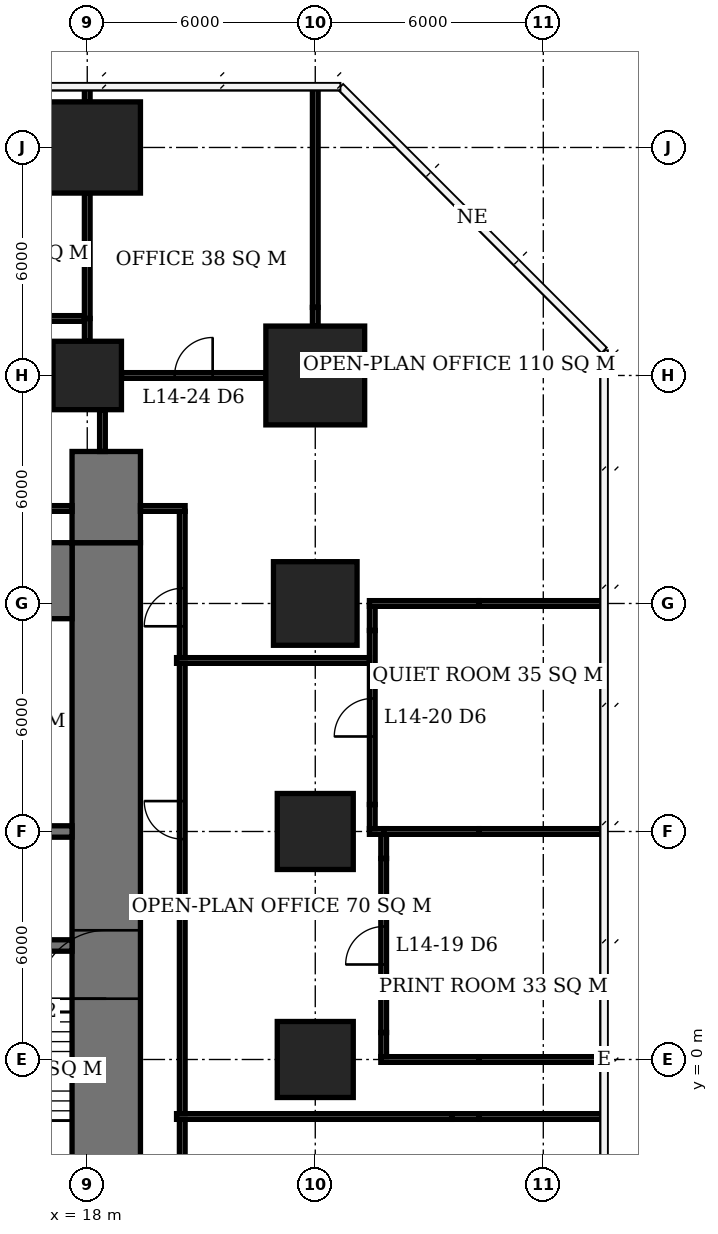
"""IFC4 building model, lengths in metres.
Left out: names, types, materials, properties, quantities, classifications, styles, units other than length and angle.
Written with IfcOpenShell. Run it as: python <this file> out.ifc"""

import sys

from ifc_helpers import new_model, si_unit, direction, frame, frame_2d, origin, origin_2d, place, context, subcontext, project, spatial, rectangle, extrude, element, fill, save


model = new_model("IFC4")
c1 = context("Model", 3, precision=1e-05, world=origin(), true_north=direction((0.0, 1.0)))
c2 = subcontext(c1, "Body", "Model", "MODEL_VIEW")
j1 = project(units=[si_unit("LENGTHUNIT", "METRE"), si_unit("PLANEANGLEUNIT", "RADIAN")], contexts=[c1])
p1 = place(None, origin())
s1 = spatial("IfcSite", under=j1, at=p1, CompositionType="ELEMENT")
p2 = place(p1, origin())
s2 = spatial("IfcBuilding", under=s1, at=p2, CompositionType="ELEMENT")
p3 = place(p2, frame((0.0, 0.0, 61.1)))
s3 = spatial("IfcBuildingStorey", under=s2, at=p3, CompositionType="ELEMENT", Elevation=61.1)
p4 = place(p3, frame((18.0, 18.0, 0.0), z_axis=(0.0, 0.0, 1.0), x_axis=(1.0, 0.0, 0.0)))
e1 = element("IfcColumn", 1, at=p4, inside=s3, PredefinedType="COLUMN", context=c2, shape_type="SweptSolid", body=[
    extrude(rectangle(XDim=1.8, YDim=1.8, at=origin_2d()), origin(), (0.0, 0.0, 1.0), 3.9),
])
p5 = place(p3, frame((18.0, 24.0, 0.0), z_axis=(0.0, 0.0, 1.0), x_axis=(1.0, 0.0, 0.0)))
e2 = element("IfcColumn", 2, at=p5, inside=s3, PredefinedType="COLUMN", context=c2, shape_type="SweptSolid", body=[
    extrude(rectangle(XDim=2.8, YDim=2.4, at=origin_2d()), origin(), (0.0, 0.0, 1.0), 3.9),
])
for number, where, z_axis, x_axis in (
    (3, (24.0, 0.0, 0.0), (0.0, 0.0, 1.0), (1.0, 0.0, 0.0)),
    (4, (24.0, 6.0, 0.0), (0.0, 0.0, 1.0), (1.0, 0.0, 0.0)),
):
    element("IfcColumn", number, at=place(p3, frame(where, z_axis=z_axis, x_axis=x_axis)), inside=s3, PredefinedType="COLUMN", context=c2, shape_type="SweptSolid", body=[
        extrude(rectangle(XDim=2.0, YDim=2.0, at=origin_2d()), origin(), (0.0, 0.0, 1.0), 3.9),
    ])
p6 = place(p3, frame((24.0, 12.0, 0.0), z_axis=(0.0, 0.0, 1.0), x_axis=(1.0, 0.0, 0.0)))
e5 = element("IfcColumn", 5, at=p6, inside=s3, PredefinedType="COLUMN", context=c2, shape_type="SweptSolid", body=[
    extrude(rectangle(XDim=2.2, YDim=2.2, at=origin_2d()), origin(), (0.0, 0.0, 1.0), 3.9),
])
p7 = place(p3, frame((24.0, 18.0, 0.0), z_axis=(0.0, 0.0, 1.0), x_axis=(1.0, 0.0, 0.0)))
e6 = element("IfcColumn", 6, at=p7, inside=s3, PredefinedType="COLUMN", context=c2, shape_type="SweptSolid", body=[
    extrude(rectangle(XDim=2.6, YDim=2.6, at=origin_2d()), origin(), (0.0, 0.0, 1.0), 3.9),
])
p8 = place(p3, frame((-5.6, 12.6, 0.0), z_axis=(0.0, 0.0, 1.0), x_axis=(1.0, 0.0, 0.0)))
e7 = element("IfcWall", 7, at=p8, inside=s3, PredefinedType="SHEAR", context=c2, shape_type="SweptSolid", body=[
    extrude(rectangle(XDim=23.2, YDim=2.0, at=frame_2d((11.6, 0.0))), origin(), (0.0, 0.0, 1.0), 3.9),
])
p9 = place(p3, frame((18.5, -7.6, 0.0), z_axis=(0.0, 0.0, 1.0), x_axis=(0.0, 1.0, 0.0)))
e8 = element("IfcWall", 8, at=p9, inside=s3, PredefinedType="SHEAR", context=c2, shape_type="SweptSolid", body=[
    extrude(rectangle(XDim=21.2, YDim=1.8, at=frame_2d((10.6, 0.0))), origin(), (0.0, 0.0, 1.0), 3.9),
])
p10 = place(p9, frame((9.2, 0.0, 0.0)))
e9 = element("IfcOpeningElement", 9, at=p10, cuts=e8, PredefinedType="OPENING", context=c2, shape_type="SweptSolid", body=[
    extrude(rectangle(XDim=1.8, YDim=2.4, at=frame_2d((0.9, 1.2))), frame((0.0, 0.91, 0.0), z_axis=(0.0, -1.0, 0.0), x_axis=(1.0, 0.0, 0.0)), (0.0, 0.0, 1.0), 1.82),
])
p11 = place(p3, frame((18.5, 13.6, 0.0), z_axis=(0.0, 0.0, 1.0), x_axis=(0.0, 1.0, 0.0)))
e10 = element("IfcWall", 10, at=p11, inside=s3, PredefinedType="SHEAR", context=c2, shape_type="SweptSolid", body=[
    extrude(rectangle(XDim=2.4, YDim=1.8, at=frame_2d((1.2, 0.0))), origin(), (0.0, 0.0, 1.0), 3.9),
])
p12 = place(p3, frame((12.15, 3.0, 0.0), z_axis=(0.0, 0.0, 1.0), x_axis=(1.0, 0.0, 0.0)))
e11 = element("IfcWall", 11, at=p12, inside=s3, PredefinedType="SHEAR", context=c2, shape_type="SweptSolid", body=[
    extrude(rectangle(XDim=5.45, YDim=0.3, at=frame_2d((2.725, 0.0))), origin(), (0.0, 0.0, 1.0), 3.9),
])
p13 = place(p12, frame((3.25, 0.0, 0.0)))
e12 = element("IfcOpeningElement", 12, at=p13, cuts=e11, PredefinedType="OPENING", context=c2, shape_type="SweptSolid", body=[
    extrude(rectangle(XDim=1.2, YDim=2.1, at=frame_2d((0.6, 1.05))), frame((0.0, 0.16, 0.0), z_axis=(0.0, -1.0, 0.0), x_axis=(1.0, 0.0, 0.0)), (0.0, 0.0, 1.0), 0.32),
])
p14 = place(p12, frame((0.45, 0.0, 0.0)))
e13 = element("IfcOpeningElement", 13, at=p14, cuts=e11, PredefinedType="OPENING", context=c2, shape_type="SweptSolid", body=[
    extrude(rectangle(XDim=0.9, YDim=2.1, at=frame_2d((0.45, 1.05))), frame((0.0, 0.16, 0.0), z_axis=(0.0, -1.0, 0.0), x_axis=(1.0, 0.0, 0.0)), (0.0, 0.0, 1.0), 0.32),
])
p15 = place(p3, frame((-0.15, 6.0, 0.0), z_axis=(0.0, 0.0, 1.0), x_axis=(1.0, 0.0, 0.0)))
e14 = element("IfcWall", 14, at=p15, inside=s3, PredefinedType="SHEAR", context=c2, shape_type="SweptSolid", body=[
    extrude(rectangle(XDim=17.75, YDim=0.3, at=frame_2d((8.875, 0.0))), origin(), (0.0, 0.0, 1.0), 3.9),
])
p16 = place(p15, frame((13.15, 0.0, 0.0)))
e15 = element("IfcOpeningElement", 15, at=p16, cuts=e14, PredefinedType="OPENING", context=c2, shape_type="SweptSolid", body=[
    extrude(rectangle(XDim=0.9, YDim=2.1, at=frame_2d((0.45, 1.05))), frame((0.0, 0.16, 0.0), z_axis=(0.0, -1.0, 0.0), x_axis=(1.0, 0.0, 0.0)), (0.0, 0.0, 1.0), 0.32),
])
p17 = place(p15, frame((1.1, 0.0, 0.0)))
e16 = element("IfcOpeningElement", 16, at=p17, cuts=e14, PredefinedType="OPENING", context=c2, shape_type="SweptSolid", body=[
    extrude(rectangle(XDim=1.1, YDim=2.1, at=frame_2d((0.55, 1.05))), frame((0.0, 0.16, 0.0), z_axis=(0.0, -1.0, 0.0), x_axis=(1.0, 0.0, 0.0)), (0.0, 0.0, 1.0), 0.32),
])
p18 = place(p15, frame((4.1, 0.0, 0.0)))
e17 = element("IfcOpeningElement", 17, at=p18, cuts=e14, PredefinedType="OPENING", context=c2, shape_type="SweptSolid", body=[
    extrude(rectangle(XDim=1.1, YDim=2.1, at=frame_2d((0.55, 1.05))), frame((0.0, 0.16, 0.0), z_axis=(0.0, -1.0, 0.0), x_axis=(1.0, 0.0, 0.0)), (0.0, 0.0, 1.0), 0.32),
])
p19 = place(p15, frame((7.1, 0.0, 0.0)))
e18 = element("IfcOpeningElement", 18, at=p19, cuts=e14, PredefinedType="OPENING", context=c2, shape_type="SweptSolid", body=[
    extrude(rectangle(XDim=1.1, YDim=2.1, at=frame_2d((0.55, 1.05))), frame((0.0, 0.16, 0.0), z_axis=(0.0, -1.0, 0.0), x_axis=(1.0, 0.0, 0.0)), (0.0, 0.0, 1.0), 0.32),
])
p20 = place(p15, frame((10.1, 0.0, 0.0)))
e19 = element("IfcOpeningElement", 19, at=p20, cuts=e14, PredefinedType="OPENING", context=c2, shape_type="SweptSolid", body=[
    extrude(rectangle(XDim=1.1, YDim=2.1, at=frame_2d((0.55, 1.05))), frame((0.0, 0.16, 0.0), z_axis=(0.0, -1.0, 0.0), x_axis=(1.0, 0.0, 0.0)), (0.0, 0.0, 1.0), 0.32),
])
p21 = place(p3, frame((25.725, 0.0, 0.0), z_axis=(0.0, 0.0, 1.0), x_axis=(1.0, 0.0, 0.0)))
e20 = element("IfcWall", 20, at=p21, inside=s3, PredefinedType="PARTITIONING", context=c2, shape_type="SweptSolid", body=[
    extrude(rectangle(XDim=2.585, YDim=0.15, at=frame_2d((1.292, 0.0))), origin(), (0.0, 0.0, 1.0), 2.65),
])
p22 = place(p3, frame((28.31, 0.0, 0.0), z_axis=(0.0, 0.0, 1.0), x_axis=(1.0, 0.0, 0.0)))
e21 = element("IfcWall", 21, at=p22, inside=s3, PredefinedType="PARTITIONING", context=c2, shape_type="SweptSolid", body=[
    extrude(rectangle(XDim=3.24, YDim=0.15, at=frame_2d((1.62, 0.0))), origin(), (0.0, 0.0, 1.0), 3.65),
])
p23 = place(p3, frame((25.425, 6.0, 0.0), z_axis=(0.0, 0.0, 1.0), x_axis=(1.0, 0.0, 0.0)))
e22 = element("IfcWall", 22, at=p23, inside=s3, PredefinedType="PARTITIONING", context=c2, shape_type="SweptSolid", body=[
    extrude(rectangle(XDim=0.45, YDim=0.15, at=frame_2d((0.225, 0.0))), origin(), (0.0, 0.0, 1.0), 2.65),
])
p24 = place(p3, frame((25.8, 6.0, 0.0), z_axis=(0.0, 0.0, 1.0), x_axis=(1.0, 0.0, 0.0)))
e23 = element("IfcWall", 23, at=p24, inside=s3, PredefinedType="PARTITIONING", context=c2, shape_type="SweptSolid", body=[
    extrude(rectangle(XDim=2.51, YDim=0.15, at=frame_2d((1.255, 0.0))), origin(), (0.0, 0.0, 1.0), 2.65),
])
p25 = place(p3, frame((28.31, 6.0, 0.0), z_axis=(0.0, 0.0, 1.0), x_axis=(1.0, 0.0, 0.0)))
e24 = element("IfcWall", 24, at=p25, inside=s3, PredefinedType="PARTITIONING", context=c2, shape_type="SweptSolid", body=[
    extrude(rectangle(XDim=3.29, YDim=0.15, at=frame_2d((1.645, 0.0))), origin(), (0.0, 0.0, 1.0), 3.65),
])
p26 = place(p3, frame((25.425, 12.0, 0.0), z_axis=(0.0, 0.0, 1.0), x_axis=(1.0, 0.0, 0.0)))
e25 = element("IfcWall", 25, at=p26, inside=s3, PredefinedType="PARTITIONING", context=c2, shape_type="SweptSolid", body=[
    extrude(rectangle(XDim=2.885, YDim=0.15, at=frame_2d((1.442, 0.0))), origin(), (0.0, 0.0, 1.0), 2.65),
])
p27 = place(p3, frame((28.31, 12.0, 0.0), z_axis=(0.0, 0.0, 1.0), x_axis=(1.0, 0.0, 0.0)))
e26 = element("IfcWall", 26, at=p27, inside=s3, PredefinedType="PARTITIONING", context=c2, shape_type="SweptSolid", body=[
    extrude(rectangle(XDim=3.29, YDim=0.15, at=frame_2d((1.645, 0.0))), origin(), (0.0, 0.0, 1.0), 3.65),
])
p28 = place(p3, frame((18.9, 18.0, 0.0), z_axis=(0.0, 0.0, 1.0), x_axis=(1.0, 0.0, 0.0)))
e27 = element("IfcWall", 27, at=p28, inside=s3, PredefinedType="PARTITIONING", context=c2, shape_type="SweptSolid", body=[
    extrude(rectangle(XDim=3.8, YDim=0.15, at=frame_2d((1.9, 0.0))), origin(), (0.0, 0.0, 1.0), 3.65),
])
p29 = place(p28, frame((1.4, 0.0, 0.0)))
e28 = element("IfcOpeningElement", 28, at=p29, cuts=e27, PredefinedType="OPENING", context=c2, shape_type="SweptSolid", body=[
    extrude(rectangle(XDim=1.0, YDim=2.1, at=frame_2d((0.5, 1.05))), frame((0.0, 0.085, 0.0), z_axis=(0.0, -1.0, 0.0), x_axis=(1.0, 0.0, 0.0)), (0.0, 0.0, 1.0), 0.17),
])
p30 = place(p3, frame((12.075, 19.5, 0.0), z_axis=(0.0, 0.0, 1.0), x_axis=(1.0, 0.0, 0.0)))
e29 = element("IfcWall", 29, at=p30, inside=s3, PredefinedType="PARTITIONING", context=c2, shape_type="SweptSolid", body=[
    extrude(rectangle(XDim=5.85, YDim=0.15, at=frame_2d((2.925, 0.0))), origin(), (0.0, 0.0, 1.0), 3.65),
])
p31 = place(p30, frame((2.425, 0.0, 0.0)))
e30 = element("IfcOpeningElement", 30, at=p31, cuts=e29, PredefinedType="OPENING", context=c2, shape_type="SweptSolid", body=[
    extrude(rectangle(XDim=1.0, YDim=2.1, at=frame_2d((0.5, 1.05))), frame((0.0, 0.085, 0.0), z_axis=(0.0, -1.0, 0.0), x_axis=(1.0, 0.0, 0.0)), (0.0, 0.0, 1.0), 0.17),
])
p32 = place(p3, frame((18.0, 18.9, 0.0), z_axis=(0.0, 0.0, 1.0), x_axis=(0.0, 1.0, 0.0)))
e31 = element("IfcWall", 31, at=p32, inside=s3, PredefinedType="PARTITIONING", context=c2, shape_type="SweptSolid", body=[
    extrude(rectangle(XDim=0.6, YDim=0.15, at=frame_2d((0.3, 0.0))), origin(), (0.0, 0.0, 1.0), 3.65),
])
p33 = place(p3, frame((18.0, 19.5, 0.0), z_axis=(0.0, 0.0, 1.0), x_axis=(0.0, 1.0, 0.0)))
e32 = element("IfcWall", 32, at=p33, inside=s3, PredefinedType="PARTITIONING", context=c2, shape_type="SweptSolid", body=[
    extrude(rectangle(XDim=3.3, YDim=0.15, at=frame_2d((1.65, 0.0))), origin(), (0.0, 0.0, 1.0), 3.65),
])
p34 = place(p3, frame((18.0, 25.2, 0.0), z_axis=(0.0, 0.0, 1.0), x_axis=(0.0, 1.0, 0.0)))
e33 = element("IfcWall", 33, at=p34, inside=s3, PredefinedType="PARTITIONING", context=c2, shape_type="SweptSolid", body=[
    extrude(rectangle(XDim=0.4, YDim=0.15, at=frame_2d((0.2, 0.0))), origin(), (0.0, 0.0, 1.0), 2.65),
])
p35 = place(p3, frame((24.0, 19.3, 0.0), z_axis=(0.0, 0.0, 1.0), x_axis=(0.0, 1.0, 0.0)))
e34 = element("IfcWall", 34, at=p35, inside=s3, PredefinedType="PARTITIONING", context=c2, shape_type="SweptSolid", body=[
    extrude(rectangle(XDim=0.492, YDim=0.15, at=frame_2d((0.246, 0.0))), origin(), (0.0, 0.0, 1.0), 2.65),
])
p36 = place(p3, frame((24.0, 19.792, 0.0), z_axis=(0.0, 0.0, 1.0), x_axis=(0.0, 1.0, 0.0)))
e35 = element("IfcWall", 35, at=p36, inside=s3, PredefinedType="PARTITIONING", context=c2, shape_type="SweptSolid", body=[
    extrude(rectangle(XDim=5.793, YDim=0.15, at=frame_2d((2.896, 0.0))), origin(), (0.0, 0.0, 1.0), 3.65),
])
p37 = place(p3, frame((25.5, 6.075, 0.0), z_axis=(0.0, 0.0, 1.0), x_axis=(0.0, 1.0, 0.0)))
e36 = element("IfcWall", 36, at=p37, inside=s3, PredefinedType="PARTITIONING", context=c2, shape_type="SweptSolid", body=[
    extrude(rectangle(XDim=0.635, YDim=0.15, at=frame_2d((0.317, 0.0))), origin(), (0.0, 0.0, 1.0), 2.65),
])
p38 = place(p3, frame((25.5, 6.71, 0.0), z_axis=(0.0, 0.0, 1.0), x_axis=(0.0, 1.0, 0.0)))
e37 = element("IfcWall", 37, at=p38, inside=s3, PredefinedType="PARTITIONING", context=c2, shape_type="SweptSolid", body=[
    extrude(rectangle(XDim=4.58, YDim=0.15, at=frame_2d((2.29, 0.0))), origin(), (0.0, 0.0, 1.0), 3.65),
])
p39 = place(p38, frame((1.79, 0.0, 0.0)))
e38 = element("IfcOpeningElement", 38, at=p39, cuts=e37, PredefinedType="OPENING", context=c2, shape_type="SweptSolid", body=[
    extrude(rectangle(XDim=1.0, YDim=2.1, at=frame_2d((0.5, 1.05))), frame((0.0, 0.085, 0.0), z_axis=(0.0, -1.0, 0.0), x_axis=(1.0, 0.0, 0.0)), (0.0, 0.0, 1.0), 0.17),
])
for number, where, z_axis, x_axis in (
    (39, (25.5, 11.29, 0.0), (0.0, 0.0, 1.0), (0.0, 1.0, 0.0)),
    (40, (25.8, 0.075, 0.0), (0.0, 0.0, 1.0), (0.0, 1.0, 0.0)),
):
    element("IfcWall", number, at=place(p3, frame(where, z_axis=z_axis, x_axis=x_axis)), inside=s3, PredefinedType="PARTITIONING", context=c2, shape_type="SweptSolid", body=[
        extrude(rectangle(XDim=0.635, YDim=0.15, at=frame_2d((0.317, 0.0))), origin(), (0.0, 0.0, 1.0), 2.65),
    ])
p40 = place(p3, frame((25.8, 0.71, 0.0), z_axis=(0.0, 0.0, 1.0), x_axis=(0.0, 1.0, 0.0)))
e41 = element("IfcWall", 41, at=p40, inside=s3, PredefinedType="PARTITIONING", context=c2, shape_type="SweptSolid", body=[
    extrude(rectangle(XDim=4.58, YDim=0.15, at=frame_2d((2.29, 0.0))), origin(), (0.0, 0.0, 1.0), 3.65),
])
p41 = place(p40, frame((1.79, 0.0, 0.0)))
e42 = element("IfcOpeningElement", 42, at=p41, cuts=e41, PredefinedType="OPENING", context=c2, shape_type="SweptSolid", body=[
    extrude(rectangle(XDim=1.0, YDim=2.1, at=frame_2d((0.5, 1.05))), frame((0.0, 0.085, 0.0), z_axis=(0.0, -1.0, 0.0), x_axis=(1.0, 0.0, 0.0)), (0.0, 0.0, 1.0), 0.17),
])
p42 = place(p3, frame((25.8, 5.29, 0.0), z_axis=(0.0, 0.0, 1.0), x_axis=(0.0, 1.0, 0.0)))
e43 = element("IfcWall", 43, at=p42, inside=s3, PredefinedType="PARTITIONING", context=c2, shape_type="SweptSolid", body=[
    extrude(rectangle(XDim=0.635, YDim=0.15, at=frame_2d((0.317, 0.0))), origin(), (0.0, 0.0, 1.0), 2.65),
])
p43 = place(p3, frame((-5.6, 14.5, 0.0), z_axis=(0.0, 0.0, 1.0), x_axis=(1.0, 0.0, 0.0)))
e44 = element("IfcWall", 44, at=p43, inside=s3, PredefinedType="PARTITIONING", context=c2, shape_type="SweptSolid", body=[
    extrude(rectangle(XDim=23.2, YDim=0.15, at=frame_2d((11.6, 0.0))), origin(), (0.0, 0.0, 1.0), 3.65),
])
p44 = place(p43, frame((14.58, 0.0, 0.0)))
e45 = element("IfcOpeningElement", 45, at=p44, cuts=e44, PredefinedType="OPENING", context=c2, shape_type="SweptSolid", body=[
    extrude(rectangle(XDim=1.0, YDim=2.1, at=frame_2d((0.5, 1.05))), frame((0.0, 0.085, 0.0), z_axis=(0.0, -1.0, 0.0), x_axis=(1.0, 0.0, 0.0)), (0.0, 0.0, 1.0), 0.17),
])
p45 = place(p3, frame((18.4, 16.0, 0.0), z_axis=(0.0, 0.0, 1.0), x_axis=(0.0, 1.0, 0.0)))
e46 = element("IfcWall", 46, at=p45, inside=s3, PredefinedType="PARTITIONING", context=c2, shape_type="SweptSolid", body=[
    extrude(rectangle(XDim=1.1, YDim=0.15, at=frame_2d((0.55, 0.0))), origin(), (0.0, 0.0, 1.0), 3.65),
])
p46 = place(p3, frame((19.4, 14.5, 0.0), z_axis=(0.0, 0.0, 1.0), x_axis=(1.0, 0.0, 0.0)))
e47 = element("IfcWall", 47, at=p46, inside=s3, PredefinedType="PARTITIONING", context=c2, shape_type="SweptSolid", body=[
    extrude(rectangle(XDim=1.175, YDim=0.15, at=frame_2d((0.587, 0.0))), origin(), (0.0, 0.0, 1.0), 3.65),
])
p47 = place(p3, frame((20.5, -8.425, 0.0), z_axis=(0.0, 0.0, 1.0), x_axis=(0.0, 1.0, 0.0)))
e48 = element("IfcWall", 48, at=p47, inside=s3, PredefinedType="PARTITIONING", context=c2, shape_type="SweptSolid", body=[
    extrude(rectangle(XDim=6.85, YDim=0.15, at=frame_2d((3.425, 0.0))), origin(), (0.0, 0.0, 1.0), 3.65),
])
p48 = place(p47, frame((1.875, 0.0, 0.0)))
e49 = element("IfcOpeningElement", 49, at=p48, cuts=e48, PredefinedType="OPENING", context=c2, shape_type="SweptSolid", body=[
    extrude(rectangle(XDim=1.0, YDim=2.1, at=frame_2d((0.5, 1.05))), frame((0.0, 0.085, 0.0), z_axis=(0.0, -1.0, 0.0), x_axis=(1.0, 0.0, 0.0)), (0.0, 0.0, 1.0), 0.17),
])
p49 = place(p3, frame((20.5, -1.425, 0.0), z_axis=(0.0, 0.0, 1.0), x_axis=(0.0, 1.0, 0.0)))
e50 = element("IfcWall", 50, at=p49, inside=s3, PredefinedType="PARTITIONING", context=c2, shape_type="SweptSolid", body=[
    extrude(rectangle(XDim=11.85, YDim=0.15, at=frame_2d((5.925, 0.0))), origin(), (0.0, 0.0, 1.0), 3.65),
])
p50 = place(p49, frame((7.225, 0.0, 0.0)))
e51 = element("IfcOpeningElement", 51, at=p50, cuts=e50, PredefinedType="OPENING", context=c2, shape_type="SweptSolid", body=[
    extrude(rectangle(XDim=1.0, YDim=2.1, at=frame_2d((0.5, 1.05))), frame((0.0, 0.085, 0.0), z_axis=(0.0, -1.0, 0.0), x_axis=(1.0, 0.0, 0.0)), (0.0, 0.0, 1.0), 0.17),
])
p51 = place(p3, frame((20.35, -1.5, 0.0), z_axis=(0.0, 0.0, 1.0), x_axis=(1.0, 0.0, 0.0)))
e52 = element("IfcWall", 52, at=p51, inside=s3, PredefinedType="PARTITIONING", context=c2, shape_type="SweptSolid", body=[
    extrude(rectangle(XDim=7.24, YDim=0.15, at=frame_2d((3.62, 0.0))), origin(), (0.0, 0.0, 1.0), 3.65),
])
p52 = place(p3, frame((27.59, -1.5, 0.0), z_axis=(0.0, 0.0, 1.0), x_axis=(1.0, 0.0, 0.0)))
e53 = element("IfcWall", 53, at=p52, inside=s3, PredefinedType="PARTITIONING", context=c2, shape_type="SweptSolid", body=[
    extrude(rectangle(XDim=0.72, YDim=0.15, at=frame_2d((0.36, 0.0))), origin(), (0.0, 0.0, 1.0), 2.65),
])
p53 = place(p3, frame((28.31, -1.5, 0.0), z_axis=(0.0, 0.0, 1.0), x_axis=(1.0, 0.0, 0.0)))
e54 = element("IfcWall", 54, at=p53, inside=s3, PredefinedType="PARTITIONING", context=c2, shape_type="SweptSolid", body=[
    extrude(rectangle(XDim=3.29, YDim=0.15, at=frame_2d((1.645, 0.0))), origin(), (0.0, 0.0, 1.0), 3.65),
])
p54 = place(p3, frame((20.5, 10.575, 0.0), z_axis=(0.0, 0.0, 1.0), x_axis=(0.0, 1.0, 0.0)))
e55 = element("IfcWall", 55, at=p54, inside=s3, PredefinedType="PARTITIONING", context=c2, shape_type="SweptSolid", body=[
    extrude(rectangle(XDim=3.85, YDim=0.15, at=frame_2d((1.925, 0.0))), origin(), (0.0, 0.0, 1.0), 3.65),
])
p55 = place(p54, frame((0.825, 0.0, 0.0)))
e56 = element("IfcOpeningElement", 56, at=p55, cuts=e55, PredefinedType="OPENING", context=c2, shape_type="SweptSolid", body=[
    extrude(rectangle(XDim=1.0, YDim=2.1, at=frame_2d((0.5, 1.05))), frame((0.0, 0.085, 0.0), z_axis=(0.0, -1.0, 0.0), x_axis=(1.0, 0.0, 0.0)), (0.0, 0.0, 1.0), 0.17),
])
p56 = place(p3, frame((20.35, 10.5, 0.0), z_axis=(0.0, 0.0, 1.0), x_axis=(1.0, 0.0, 0.0)))
e57 = element("IfcWall", 57, at=p56, inside=s3, PredefinedType="PARTITIONING", context=c2, shape_type="SweptSolid", body=[
    extrude(rectangle(XDim=5.075, YDim=0.15, at=frame_2d((2.538, 0.0))), origin(), (0.0, 0.0, 1.0), 3.65),
])
p57 = place(p10, origin())
e58 = element("IfcDoor", 58, at=p57, inside=s3, OperationType="DOUBLE_DOOR_SINGLE_SWING", PredefinedType="DOOR", context=c2, shape_type="SweptSolid", body=[
    extrude(rectangle(XDim=1.8, YDim=2.4, at=frame_2d((0.9, 1.2))), frame((0.0, 0.025, 0.0), z_axis=(0.0, -1.0, 0.0), x_axis=(1.0, 0.0, 0.0)), (0.0, 0.0, 1.0), 0.05),
])
fill(e9, e58)
p58 = place(p41, origin())
e59 = element("IfcDoor", 59, at=p58, inside=s3, OperationType="SINGLE_SWING_LEFT", PredefinedType="DOOR", context=c2, shape_type="SweptSolid", body=[
    extrude(rectangle(XDim=1.0, YDim=2.1, at=frame_2d((0.5, 1.05))), frame((0.0, 0.025, 0.0), z_axis=(0.0, -1.0, 0.0), x_axis=(1.0, 0.0, 0.0)), (0.0, 0.0, 1.0), 0.05),
])
fill(e42, e59)
p59 = place(p39, origin())
e60 = element("IfcDoor", 60, at=p59, inside=s3, OperationType="SINGLE_SWING_LEFT", PredefinedType="DOOR", context=c2, shape_type="SweptSolid", body=[
    extrude(rectangle(XDim=1.0, YDim=2.1, at=frame_2d((0.5, 1.05))), frame((0.0, 0.025, 0.0), z_axis=(0.0, -1.0, 0.0), x_axis=(1.0, 0.0, 0.0)), (0.0, 0.0, 1.0), 0.05),
])
fill(e38, e60)
p60 = place(p29, origin())
e61 = element("IfcDoor", 61, at=p60, inside=s3, OperationType="SINGLE_SWING_RIGHT", PredefinedType="DOOR", context=c2, shape_type="SweptSolid", body=[
    extrude(rectangle(XDim=1.0, YDim=2.1, at=frame_2d((0.5, 1.05))), frame((0.0, 0.025, 0.0), z_axis=(0.0, -1.0, 0.0), x_axis=(1.0, 0.0, 0.0)), (0.0, 0.0, 1.0), 0.05),
])
fill(e28, e61)
p61 = place(p50, origin())
e62 = element("IfcDoor", 62, at=p61, inside=s3, OperationType="SINGLE_SWING_RIGHT", PredefinedType="DOOR", context=c2, shape_type="SweptSolid", body=[
    extrude(rectangle(XDim=1.0, YDim=2.1, at=frame_2d((0.5, 1.05))), frame((0.0, 0.025, 0.0), z_axis=(0.0, -1.0, 0.0), x_axis=(1.0, 0.0, 0.0)), (0.0, 0.0, 1.0), 0.05),
])
fill(e51, e62)
p62 = place(p55, origin())
e63 = element("IfcDoor", 63, at=p62, inside=s3, OperationType="SINGLE_SWING_LEFT", PredefinedType="DOOR", context=c2, shape_type="SweptSolid", body=[
    extrude(rectangle(XDim=1.0, YDim=2.1, at=frame_2d((0.5, 1.05))), frame((0.0, 0.025, 0.0), z_axis=(0.0, -1.0, 0.0), x_axis=(1.0, 0.0, 0.0)), (0.0, 0.0, 1.0), 0.05),
])
fill(e56, e63)
save(model, sys.argv[1])
